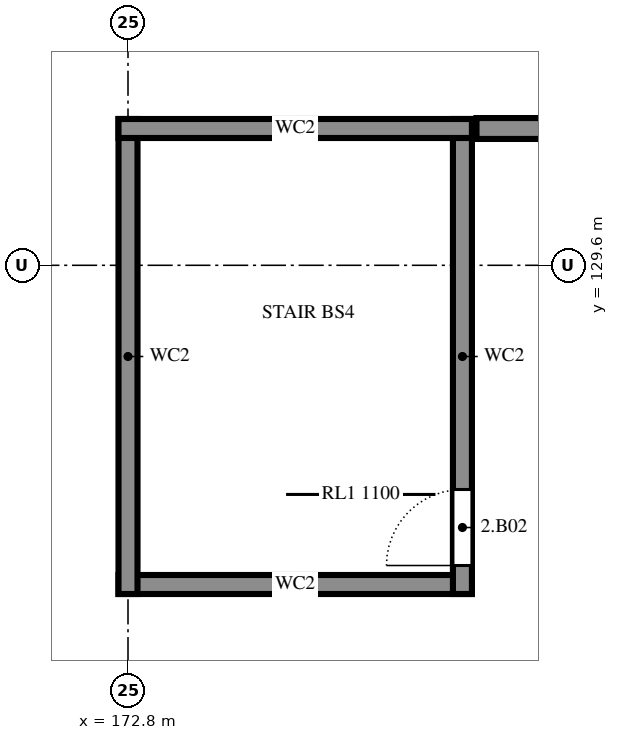
"""IFC4 building model, lengths in metres.
Left out: names, types, materials, properties, quantities, classifications, styles, units other than length and angle.
Written with IfcOpenShell. Run it as: python <this file> out.ifc"""

import sys

from ifc_helpers import new_model, si_unit, direction, frame, frame_2d, origin, place, context, subcontext, project, spatial, rectangle, extrude, element, fill, save


model = new_model("IFC4")
c1 = context("Model", 3, precision=1e-05, world=origin(), true_north=direction((0.0, 1.0)))
c2 = subcontext(c1, "Body", "Model", "MODEL_VIEW")
j1 = project(units=[si_unit("LENGTHUNIT", "METRE"), si_unit("PLANEANGLEUNIT", "RADIAN")], contexts=[c1])
p1 = place(None, origin())
s1 = spatial("IfcSite", under=j1, at=p1, CompositionType="ELEMENT")
p2 = place(p1, origin())
s2 = spatial("IfcBuilding", under=s1, at=p2, CompositionType="ELEMENT")
p3 = place(p2, frame((0.0, 0.0, 7.2)))
s3 = spatial("IfcBuildingStorey", under=s2, at=p3, CompositionType="ELEMENT", Elevation=7.2)
p4 = place(p3, frame((172.675, 125.4, 0.0), z_axis=(0.0, 0.0, 1.0), x_axis=(1.0, 0.0, 0.0)))
e1 = element("IfcWall", 1, at=p4, inside=s3, PredefinedType="SHEAR", context=c2, shape_type="SweptSolid", body=[
    extrude(rectangle(XDim=4.65, YDim=0.25, at=frame_2d((2.325, 0.0))), origin(), (0.0, 0.0, 1.0), 3.6),
])
p5 = place(p3, frame((177.2, 125.275, 0.0), z_axis=(0.0, 0.0, 1.0), x_axis=(0.0, 1.0, 0.0)))
e2 = element("IfcWall", 2, at=p5, inside=s3, PredefinedType="SHEAR", context=c2, shape_type="SweptSolid", body=[
    extrude(rectangle(XDim=6.25, YDim=0.25, at=frame_2d((3.125, 0.0))), origin(), (0.0, 0.0, 1.0), 3.6),
])
p6 = place(p5, frame((0.375, 0.0, 0.0)))
e3 = element("IfcOpeningElement", 3, at=p6, cuts=e2, PredefinedType="OPENING", context=c2, shape_type="SweptSolid", body=[
    extrude(rectangle(XDim=1.0, YDim=2.4, at=frame_2d((0.5, 1.2))), frame((0.0, 0.135, 0.0), z_axis=(0.0, -1.0, 0.0), x_axis=(1.0, 0.0, 0.0)), (0.0, 0.0, 1.0), 0.27),
])
p7 = place(p3, frame((172.8, 131.525, 0.0), z_axis=(0.0, 0.0, 1.0), x_axis=(0.0, -1.0, 0.0)))
e4 = element("IfcWall", 4, at=p7, inside=s3, PredefinedType="SHEAR", context=c2, shape_type="SweptSolid", body=[
    extrude(rectangle(XDim=6.25, YDim=0.25, at=frame_2d((3.125, 0.0))), origin(), (0.0, 0.0, 1.0), 3.6),
])
p8 = place(p3, frame((177.325, 131.4, 0.0), z_axis=(0.0, 0.0, 1.0), x_axis=(-1.0, 0.0, 0.0)))
e5 = element("IfcWall", 5, at=p8, inside=s3, PredefinedType="SHEAR", context=c2, shape_type="SweptSolid", body=[
    extrude(rectangle(XDim=4.65, YDim=0.25, at=frame_2d((2.325, 0.0))), origin(), (0.0, 0.0, 1.0), 3.6),
])
p9 = place(p3, frame((172.8, 122.64, 0.0), z_axis=(0.0, 0.0, 1.0), x_axis=(0.0, 1.0, 0.0)))
e6 = element("IfcWall", 6, at=p9, inside=s3, PredefinedType="PARTITIONING", context=c2, shape_type="SweptSolid", body=[
    extrude(rectangle(XDim=2.575, YDim=0.275, at=frame_2d((1.288, 0.0))), origin(), (0.0, 0.0, 1.0), 3.6),
])
p10 = place(p3, frame((177.385, 131.4, 0.0), z_axis=(0.0, 0.0, 1.0), x_axis=(1.0, 0.0, 0.0)))
e7 = element("IfcWall", 7, at=p10, inside=s3, PredefinedType="PARTITIONING", context=c2, shape_type="SweptSolid", body=[
    extrude(rectangle(XDim=2.752, YDim=0.275, at=frame_2d((1.376, 0.0))), origin(), (0.0, 0.0, 1.0), 3.6),
])
p11 = place(p6, origin())
e8 = element("IfcDoor", 8, at=p11, inside=s3, OperationType="SINGLE_SWING_RIGHT", PredefinedType="DOOR", context=c2, shape_type="SweptSolid", body=[
    extrude(rectangle(XDim=1.0, YDim=2.4, at=frame_2d((0.5, 1.2))), frame((0.0, 0.025, 0.0), z_axis=(0.0, -1.0, 0.0), x_axis=(1.0, 0.0, 0.0)), (0.0, 0.0, 1.0), 0.05),
])
fill(e3, e8)
save(model, sys.argv[1])
